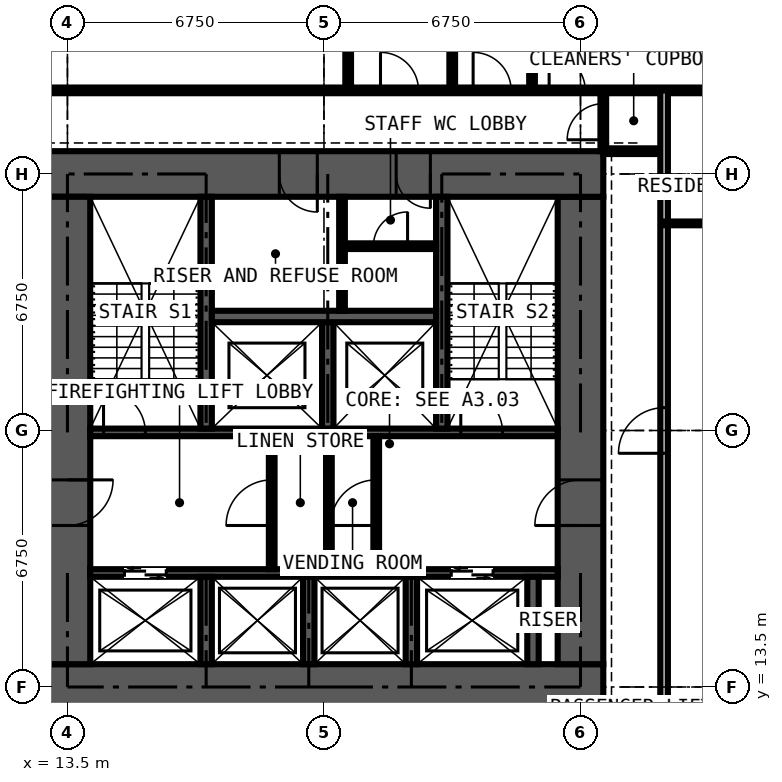
"""IFC4 building model, lengths in metres.
Left out: names, types, materials, properties, quantities, classifications, styles, units other than length and angle.
Written with IfcOpenShell. Run it as: python <this file> out.ifc"""

import sys

from ifc_helpers import new_model, si_unit, direction, frame, frame_2d, origin, place, context, subcontext, project, spatial, rectangle, extrude, element, fill, save


model = new_model("IFC4")
c1 = context("Model", 3, precision=1e-05, world=origin(), true_north=direction((0.0, 1.0)))
c2 = subcontext(c1, "Body", "Model", "MODEL_VIEW")
j1 = project(units=[si_unit("LENGTHUNIT", "METRE"), si_unit("PLANEANGLEUNIT", "RADIAN")], contexts=[c1])
p1 = place(None, origin())
s1 = spatial("IfcSite", under=j1, at=p1, CompositionType="ELEMENT")
p2 = place(p1, origin())
s2 = spatial("IfcBuilding", under=s1, at=p2, CompositionType="ELEMENT")
p3 = place(p2, frame((0.0, 0.0, 43.2)))
s3 = spatial("IfcBuildingStorey", under=s2, at=p3, CompositionType="ELEMENT", Elevation=43.2)
p4 = place(p3, frame((12.9, 13.5, 0.0), z_axis=(0.0, 0.0, 1.0), x_axis=(1.0, 0.0, 0.0)))
e1 = element("IfcWall", 1, at=p4, inside=s3, PredefinedType="SHEAR", context=c2, shape_type="SweptSolid", body=[
    extrude(rectangle(XDim=14.7, YDim=1.2, at=frame_2d((7.35, 0.0))), origin(), (0.0, 0.0, 1.0), 3.6),
])
p5 = place(p3, frame((27.0, 14.1, 0.0), z_axis=(0.0, 0.0, 1.0), x_axis=(0.0, 1.0, 0.0)))
e2 = element("IfcWall", 2, at=p5, inside=s3, PredefinedType="SHEAR", context=c2, shape_type="SweptSolid", body=[
    extrude(rectangle(XDim=12.3, YDim=1.2, at=frame_2d((6.15, 0.0))), origin(), (0.0, 0.0, 1.0), 3.6),
])
p6 = place(p5, frame((3.65, 0.0, 0.0)))
e3 = element("IfcOpeningElement", 3, at=p6, cuts=e2, PredefinedType="OPENING", context=c2, shape_type="SweptSolid", body=[
    extrude(rectangle(XDim=1.2, YDim=2.2, at=frame_2d((0.6, 1.1))), frame((0.0, 0.61, 0.0), z_axis=(0.0, -1.0, 0.0), x_axis=(1.0, 0.0, 0.0)), (0.0, 0.0, 1.0), 1.22),
])
p7 = place(p3, frame((27.6, 27.0, 0.0), z_axis=(0.0, 0.0, 1.0), x_axis=(-1.0, 0.0, 0.0)))
e4 = element("IfcWall", 4, at=p7, inside=s3, PredefinedType="SHEAR", context=c2, shape_type="SweptSolid", body=[
    extrude(rectangle(XDim=14.7, YDim=1.2, at=frame_2d((7.35, 0.0))), origin(), (0.0, 0.0, 1.0), 3.6),
])
p8 = place(p7, frame((4.55, 0.0, 0.0)))
e5 = element("IfcOpeningElement", 5, at=p8, cuts=e4, PredefinedType="OPENING", context=c2, shape_type="SweptSolid", body=[
    extrude(rectangle(XDim=0.9, YDim=2.2, at=frame_2d((0.45, 1.1))), frame((0.0, 0.61, 0.0), z_axis=(0.0, -1.0, 0.0), x_axis=(1.0, 0.0, 0.0)), (0.0, 0.0, 1.0), 1.22),
])
p9 = place(p7, frame((7.525, 0.0, 0.0)))
e6 = element("IfcOpeningElement", 6, at=p9, cuts=e4, PredefinedType="OPENING", context=c2, shape_type="SweptSolid", body=[
    extrude(rectangle(XDim=1.0, YDim=2.2, at=frame_2d((0.5, 1.1))), frame((0.0, 0.61, 0.0), z_axis=(0.0, -1.0, 0.0), x_axis=(1.0, 0.0, 0.0)), (0.0, 0.0, 1.0), 1.22),
])
p10 = place(p3, frame((13.5, 26.4, 0.0), z_axis=(0.0, 0.0, 1.0), x_axis=(0.0, -1.0, 0.0)))
e7 = element("IfcWall", 7, at=p10, inside=s3, PredefinedType="SHEAR", context=c2, shape_type="SweptSolid", body=[
    extrude(rectangle(XDim=12.3, YDim=1.2, at=frame_2d((6.15, 0.0))), origin(), (0.0, 0.0, 1.0), 3.6),
])
p11 = place(p10, frame((7.45, 0.0, 0.0)))
e8 = element("IfcOpeningElement", 8, at=p11, cuts=e7, PredefinedType="OPENING", context=c2, shape_type="SweptSolid", body=[
    extrude(rectangle(XDim=1.2, YDim=2.2, at=frame_2d((0.6, 1.1))), frame((0.0, 0.61, 0.0), z_axis=(0.0, -1.0, 0.0), x_axis=(1.0, 0.0, 0.0)), (0.0, 0.0, 1.0), 1.22),
])
p12 = place(p3, frame((14.1, 16.5, 0.0), z_axis=(0.0, 0.0, 1.0), x_axis=(1.0, 0.0, 0.0)))
e9 = element("IfcWall", 9, at=p12, inside=s3, PredefinedType="SHEAR", context=c2, shape_type="SweptSolid", body=[
    extrude(rectangle(XDim=12.3, YDim=0.2, at=frame_2d((6.15, 0.0))), origin(), (0.0, 0.0, 1.0), 3.6),
])
p13 = place(p12, frame((0.9, 0.0, 0.0)))
e10 = element("IfcOpeningElement", 10, at=p13, cuts=e9, PredefinedType="OPENING", context=c2, shape_type="SweptSolid", body=[
    extrude(rectangle(XDim=1.1, YDim=2.2, at=frame_2d((0.55, 1.1))), frame((0.0, 0.11, 0.0), z_axis=(0.0, -1.0, 0.0), x_axis=(1.0, 0.0, 0.0)), (0.0, 0.0, 1.0), 0.22),
])
p14 = place(p12, frame((9.5, 0.0, 0.0)))
e11 = element("IfcOpeningElement", 11, at=p14, cuts=e9, PredefinedType="OPENING", context=c2, shape_type="SweptSolid", body=[
    extrude(rectangle(XDim=1.1, YDim=2.2, at=frame_2d((0.55, 1.1))), frame((0.0, 0.11, 0.0), z_axis=(0.0, -1.0, 0.0), x_axis=(1.0, 0.0, 0.0)), (0.0, 0.0, 1.0), 0.22),
])
p15 = place(p3, frame((14.1, 20.2, 0.0), z_axis=(0.0, 0.0, 1.0), x_axis=(1.0, 0.0, 0.0)))
e12 = element("IfcWall", 12, at=p15, inside=s3, PredefinedType="SHEAR", context=c2, shape_type="SweptSolid", body=[
    extrude(rectangle(XDim=12.3, YDim=0.2, at=frame_2d((6.15, 0.0))), origin(), (0.0, 0.0, 1.0), 3.6),
])
p16 = place(p15, frame((0.35, 0.0, 0.0)))
e13 = element("IfcOpeningElement", 13, at=p16, cuts=e12, PredefinedType="OPENING", context=c2, shape_type="SweptSolid", body=[
    extrude(rectangle(XDim=1.1, YDim=2.2, at=frame_2d((0.55, 1.1))), frame((0.0, 0.11, 0.0), z_axis=(0.0, -1.0, 0.0), x_axis=(1.0, 0.0, 0.0)), (0.0, 0.0, 1.0), 0.22),
])
p17 = place(p15, frame((9.75, 0.0, 0.0)))
e14 = element("IfcOpeningElement", 14, at=p17, cuts=e12, PredefinedType="OPENING", context=c2, shape_type="SweptSolid", body=[
    extrude(rectangle(XDim=1.1, YDim=2.2, at=frame_2d((0.55, 1.1))), frame((0.0, 0.11, 0.0), z_axis=(0.0, -1.0, 0.0), x_axis=(1.0, 0.0, 0.0)), (0.0, 0.0, 1.0), 0.22),
])
for number, where, z_axis, x_axis in (
    (15, (17.15, 20.3, 0.0), (0.0, 0.0, 1.0), (0.0, 1.0, 0.0)),
    (16, (23.35, 20.3, 0.0), (0.0, 0.0, 1.0), (0.0, 1.0, 0.0)),
):
    element("IfcWall", number, at=place(p3, frame(where, z_axis=z_axis, x_axis=x_axis)), inside=s3, PredefinedType="SHEAR", context=c2, shape_type="SweptSolid", body=[
        extrude(rectangle(XDim=6.1, YDim=0.3, at=frame_2d((3.05, 0.0))), origin(), (0.0, 0.0, 1.0), 3.6),
    ])
p18 = place(p3, frame((20.35, 20.3, 0.0), z_axis=(0.0, 0.0, 1.0), x_axis=(0.0, 1.0, 0.0)))
e17 = element("IfcWall", 17, at=p18, inside=s3, PredefinedType="SHEAR", context=c2, shape_type="SweptSolid", body=[
    extrude(rectangle(XDim=2.8, YDim=0.3, at=frame_2d((1.4, 0.0))), origin(), (0.0, 0.0, 1.0), 3.6),
])
p19 = place(p3, frame((17.3, 23.25, 0.0), z_axis=(0.0, 0.0, 1.0), x_axis=(1.0, 0.0, 0.0)))
e18 = element("IfcWall", 18, at=p19, inside=s3, PredefinedType="SHEAR", context=c2, shape_type="SweptSolid", body=[
    extrude(rectangle(XDim=5.9, YDim=0.3, at=frame_2d((2.95, 0.0))), origin(), (0.0, 0.0, 1.0), 3.6),
])
for number, where, z_axis, x_axis in (
    (19, (17.15, 14.1, 0.0), (0.0, 0.0, 1.0), (0.0, 1.0, 0.0)),
    (20, (19.85, 14.1, 0.0), (0.0, 0.0, 1.0), (0.0, 1.0, 0.0)),
    (21, (22.55, 14.1, 0.0), (0.0, 0.0, 1.0), (0.0, 1.0, 0.0)),
    (22, (25.75, 14.1, 0.0), (0.0, 0.0, 1.0), (0.0, 1.0, 0.0)),
):
    element("IfcWall", number, at=place(p3, frame(where, z_axis=z_axis, x_axis=x_axis)), inside=s3, PredefinedType="SHEAR", context=c2, shape_type="SweptSolid", body=[
        extrude(rectangle(XDim=2.3, YDim=0.3, at=frame_2d((1.15, 0.0))), origin(), (0.0, 0.0, 1.0), 3.6),
    ])
p20 = place(p3, frame((18.875, 16.6, 0.0), z_axis=(0.0, 0.0, 1.0), x_axis=(0.0, 1.0, 0.0)))
e23 = element("IfcWall", 23, at=p20, inside=s3, PredefinedType="PARTITIONING", context=c2, shape_type="SweptSolid", body=[
    extrude(rectangle(XDim=3.5, YDim=0.15, at=frame_2d((1.75, 0.0))), origin(), (0.0, 0.0, 1.0), 3.375),
])
p21 = place(p20, frame((1.15, 0.0, 0.0)))
e24 = element("IfcOpeningElement", 24, at=p21, cuts=e23, PredefinedType="OPENING", context=c2, shape_type="SweptSolid", body=[
    extrude(rectangle(XDim=1.2, YDim=2.2, at=frame_2d((0.6, 1.1))), frame((0.0, 0.085, 0.0), z_axis=(0.0, -1.0, 0.0), x_axis=(1.0, 0.0, 0.0)), (0.0, 0.0, 1.0), 0.17),
])
p22 = place(p3, frame((21.625, 16.6, 0.0), z_axis=(0.0, 0.0, 1.0), x_axis=(0.0, 1.0, 0.0)))
e25 = element("IfcWall", 25, at=p22, inside=s3, PredefinedType="PARTITIONING", context=c2, shape_type="SweptSolid", body=[
    extrude(rectangle(XDim=3.5, YDim=0.15, at=frame_2d((1.75, 0.0))), origin(), (0.0, 0.0, 1.0), 3.375),
])
p23 = place(p22, frame((1.15, 0.0, 0.0)))
e26 = element("IfcOpeningElement", 26, at=p23, cuts=e25, PredefinedType="OPENING", context=c2, shape_type="SweptSolid", body=[
    extrude(rectangle(XDim=1.2, YDim=2.2, at=frame_2d((0.6, 1.1))), frame((0.0, 0.085, 0.0), z_axis=(0.0, -1.0, 0.0), x_axis=(1.0, 0.0, 0.0)), (0.0, 0.0, 1.0), 0.17),
])
p24 = place(p3, frame((20.38, 16.6, 0.0), z_axis=(0.0, 0.0, 1.0), x_axis=(0.0, 1.0, 0.0)))
e27 = element("IfcWall", 27, at=p24, inside=s3, PredefinedType="PARTITIONING", context=c2, shape_type="SweptSolid", body=[
    extrude(rectangle(XDim=3.5, YDim=0.15, at=frame_2d((1.75, 0.0))), origin(), (0.0, 0.0, 1.0), 3.375),
])
p25 = place(p3, frame((20.725, 23.4, 0.0), z_axis=(0.0, 0.0, 1.0), x_axis=(0.0, 1.0, 0.0)))
e28 = element("IfcWall", 28, at=p25, inside=s3, PredefinedType="PARTITIONING", context=c2, shape_type="SweptSolid", body=[
    extrude(rectangle(XDim=3.0, YDim=0.15, at=frame_2d((1.5, 0.0))), origin(), (0.0, 0.0, 1.0), 3.375),
])
p26 = place(p3, frame((20.8, 25.1, 0.0), z_axis=(0.0, 0.0, 1.0), x_axis=(1.0, 0.0, 0.0)))
e29 = element("IfcWall", 29, at=p26, inside=s3, PredefinedType="PARTITIONING", context=c2, shape_type="SweptSolid", body=[
    extrude(rectangle(XDim=2.4, YDim=0.15, at=frame_2d((1.2, 0.0))), origin(), (0.0, 0.0, 1.0), 3.375),
])
p27 = place(p26, frame((0.75, 0.0, 0.0)))
e30 = element("IfcOpeningElement", 30, at=p27, cuts=e29, PredefinedType="OPENING", context=c2, shape_type="SweptSolid", body=[
    extrude(rectangle(XDim=0.9, YDim=2.2, at=frame_2d((0.45, 1.1))), frame((0.0, 0.085, 0.0), z_axis=(0.0, -1.0, 0.0), x_axis=(1.0, 0.0, 0.0)), (0.0, 0.0, 1.0), 0.17),
])
p28 = place(p3, frame((11.3, 29.2, 0.0), z_axis=(0.0, 0.0, 1.0), x_axis=(1.0, 0.0, 0.0)))
e31 = element("IfcWall", 31, at=p28, inside=s3, PredefinedType="PARTITIONING", context=c2, shape_type="SweptSolid", body=[
    extrude(rectangle(XDim=19.075, YDim=0.15, at=frame_2d((9.538, 0.0))), origin(), (0.0, 0.0, 1.0), 3.375),
])
p29 = place(p28, frame((12.875, 0.0, 0.0)))
e32 = element("IfcOpeningElement", 32, at=p29, cuts=e31, PredefinedType="OPENING", context=c2, shape_type="SweptSolid", body=[
    extrude(rectangle(XDim=1.0, YDim=2.2, at=frame_2d((0.5, 1.1))), frame((0.0, 0.085, 0.0), z_axis=(0.0, -1.0, 0.0), x_axis=(1.0, 0.0, 0.0)), (0.0, 0.0, 1.0), 0.17),
])
p30 = place(p28, frame((10.438, 0.0, 0.0)))
e33 = element("IfcOpeningElement", 33, at=p30, cuts=e31, PredefinedType="OPENING", context=c2, shape_type="SweptSolid", body=[
    extrude(rectangle(XDim=1.0, YDim=2.2, at=frame_2d((0.5, 1.1))), frame((0.0, 0.085, 0.0), z_axis=(0.0, -1.0, 0.0), x_axis=(1.0, 0.0, 0.0)), (0.0, 0.0, 1.0), 0.17),
])
p31 = place(p28, frame((14.875, 0.0, 0.0)))
e34 = element("IfcOpeningElement", 34, at=p31, cuts=e31, PredefinedType="OPENING", context=c2, shape_type="SweptSolid", body=[
    extrude(rectangle(XDim=0.95, YDim=2.2, at=frame_2d((0.475, 1.1))), frame((0.0, 0.085, 0.0), z_axis=(0.0, -1.0, 0.0), x_axis=(1.0, 0.0, 0.0)), (0.0, 0.0, 1.0), 0.17),
])
p32 = place(p3, frame((20.887, 29.2, 0.0), z_axis=(0.0, 0.0, 1.0), x_axis=(0.0, 1.0, 0.0)))
e35 = element("IfcWall", 35, at=p32, inside=s3, PredefinedType="PARTITIONING", context=c2, shape_type="SweptSolid", body=[
    extrude(rectangle(XDim=5.65, YDim=0.15, at=frame_2d((2.825, 0.0))), origin(), (0.0, 0.0, 1.0), 3.375),
])
p33 = place(p3, frame((23.625, 29.2, 0.0), z_axis=(0.0, 0.0, 1.0), x_axis=(0.0, 1.0, 0.0)))
e36 = element("IfcWall", 36, at=p33, inside=s3, PredefinedType="PARTITIONING", context=c2, shape_type="SweptSolid", body=[
    extrude(rectangle(XDim=12.034, YDim=0.15, at=frame_2d((6.017, 0.0))), origin(), (0.0, 0.0, 1.0), 3.375),
])
p34 = place(p3, frame((25.725, 29.2, 0.0), z_axis=(0.0, 0.0, 1.0), x_axis=(0.0, 1.0, 0.0)))
e37 = element("IfcWall", 37, at=p34, inside=s3, PredefinedType="PARTITIONING", context=c2, shape_type="SweptSolid", body=[
    extrude(rectangle(XDim=5.65, YDim=0.15, at=frame_2d((2.825, 0.0))), origin(), (0.0, 0.0, 1.0), 3.375),
])
p35 = place(p3, frame((27.6, 27.6, 0.0), z_axis=(0.0, 0.0, 1.0), x_axis=(0.0, 1.0, 0.0)))
e38 = element("IfcWall", 38, at=p35, inside=s3, PredefinedType="PARTITIONING", context=c2, shape_type="SweptSolid", body=[
    extrude(rectangle(XDim=1.6, YDim=0.15, at=frame_2d((0.8, 0.0))), origin(), (0.0, 0.0, 1.0), 3.375),
])
p36 = place(p35, frame((0.3, 0.0, 0.0)))
e39 = element("IfcOpeningElement", 39, at=p36, cuts=e38, PredefinedType="OPENING", context=c2, shape_type="SweptSolid", body=[
    extrude(rectangle(XDim=0.95, YDim=2.2, at=frame_2d((0.475, 1.1))), frame((0.0, 0.085, 0.0), z_axis=(0.0, -1.0, 0.0), x_axis=(1.0, 0.0, 0.0)), (0.0, 0.0, 1.0), 0.17),
])
p37 = place(p3, frame((27.6, 27.6, 0.0), z_axis=(0.0, 0.0, 1.0), x_axis=(1.0, 0.0, 0.0)))
e40 = element("IfcWall", 40, at=p37, inside=s3, PredefinedType="PARTITIONING", context=c2, shape_type="SweptSolid", body=[
    extrude(rectangle(XDim=1.6, YDim=0.15, at=frame_2d((0.8, 0.0))), origin(), (0.0, 0.0, 1.0), 2.877),
])
p38 = place(p3, frame((29.2, 11.3, 0.0), z_axis=(0.0, 0.0, 1.0), x_axis=(0.0, 1.0, 0.0)))
e41 = element("IfcWall", 41, at=p38, inside=s3, PredefinedType="PARTITIONING", context=c2, shape_type="SweptSolid", body=[
    extrude(rectangle(XDim=17.9, YDim=0.2, at=frame_2d((8.95, 0.0))), origin(), (0.0, 0.0, 1.0), 3.375),
])
p39 = place(p38, frame((8.35, 0.0, 0.0)))
e42 = element("IfcOpeningElement", 42, at=p39, cuts=e41, PredefinedType="OPENING", context=c2, shape_type="SweptSolid", body=[
    extrude(rectangle(XDim=1.2, YDim=2.2, at=frame_2d((0.6, 1.1))), frame((0.0, 0.11, 0.0), z_axis=(0.0, -1.0, 0.0), x_axis=(1.0, 0.0, 0.0)), (0.0, 0.0, 1.0), 0.22),
])
p40 = place(p3, frame((29.2, 25.7, 0.0), z_axis=(0.0, 0.0, 1.0), x_axis=(1.0, 0.0, 0.0)))
e43 = element("IfcWall", 43, at=p40, inside=s3, PredefinedType="SHEAR", context=c2, shape_type="SweptSolid", body=[
    extrude(rectangle(XDim=3.45, YDim=0.1, at=frame_2d((1.725, 0.0))), origin(), (0.0, 0.0, 1.0), 3.375),
])
p41 = place(p13, origin())
e44 = element("IfcDoor", 44, at=p41, inside=s3, OperationType="DOUBLE_DOOR_SLIDING", PredefinedType="DOOR", context=c2, shape_type="SweptSolid", body=[
    extrude(rectangle(XDim=1.1, YDim=2.2, at=frame_2d((0.55, 1.1))), frame((0.0, 0.025, 0.0), z_axis=(0.0, -1.0, 0.0), x_axis=(1.0, 0.0, 0.0)), (0.0, 0.0, 1.0), 0.05),
])
fill(e10, e44)
p42 = place(p14, origin())
e45 = element("IfcDoor", 45, at=p42, inside=s3, OperationType="DOUBLE_DOOR_SLIDING", PredefinedType="DOOR", context=c2, shape_type="SweptSolid", body=[
    extrude(rectangle(XDim=1.1, YDim=2.2, at=frame_2d((0.55, 1.1))), frame((0.0, 0.025, 0.0), z_axis=(0.0, -1.0, 0.0), x_axis=(1.0, 0.0, 0.0)), (0.0, 0.0, 1.0), 0.05),
])
fill(e11, e45)
p43 = place(p11, origin())
e46 = element("IfcDoor", 46, at=p43, inside=s3, OperationType="DOUBLE_DOOR_SINGLE_SWING", PredefinedType="DOOR", context=c2, shape_type="SweptSolid", body=[
    extrude(rectangle(XDim=1.2, YDim=2.2, at=frame_2d((0.6, 1.1))), frame((0.0, 0.025, 0.0), z_axis=(0.0, -1.0, 0.0), x_axis=(1.0, 0.0, 0.0)), (0.0, 0.0, 1.0), 0.05),
])
fill(e8, e46)
p44 = place(p6, origin())
e47 = element("IfcDoor", 47, at=p44, inside=s3, OperationType="DOUBLE_DOOR_SINGLE_SWING", PredefinedType="DOOR", context=c2, shape_type="SweptSolid", body=[
    extrude(rectangle(XDim=1.2, YDim=2.2, at=frame_2d((0.6, 1.1))), frame((0.0, 0.025, 0.0), z_axis=(0.0, -1.0, 0.0), x_axis=(1.0, 0.0, 0.0)), (0.0, 0.0, 1.0), 0.05),
])
fill(e3, e47)
p45 = place(p21, origin())
e48 = element("IfcDoor", 48, at=p45, inside=s3, OperationType="DOUBLE_DOOR_SINGLE_SWING", PredefinedType="DOOR", context=c2, shape_type="SweptSolid", body=[
    extrude(rectangle(XDim=1.2, YDim=2.2, at=frame_2d((0.6, 1.1))), frame((0.0, 0.025, 0.0), z_axis=(0.0, -1.0, 0.0), x_axis=(1.0, 0.0, 0.0)), (0.0, 0.0, 1.0), 0.05),
])
fill(e24, e48)
p46 = place(p23, origin())
e49 = element("IfcDoor", 49, at=p46, inside=s3, OperationType="DOUBLE_DOOR_SINGLE_SWING", PredefinedType="DOOR", context=c2, shape_type="SweptSolid", body=[
    extrude(rectangle(XDim=1.2, YDim=2.2, at=frame_2d((0.6, 1.1))), frame((0.0, 0.025, 0.0), z_axis=(0.0, -1.0, 0.0), x_axis=(1.0, 0.0, 0.0)), (0.0, 0.0, 1.0), 0.05),
])
fill(e26, e49)
p47 = place(p27, origin())
e50 = element("IfcDoor", 50, at=p47, inside=s3, OperationType="SINGLE_SWING_RIGHT", PredefinedType="DOOR", context=c2, shape_type="SweptSolid", body=[
    extrude(rectangle(XDim=0.9, YDim=2.2, at=frame_2d((0.45, 1.1))), frame((0.0, 0.025, 0.0), z_axis=(0.0, -1.0, 0.0), x_axis=(1.0, 0.0, 0.0)), (0.0, 0.0, 1.0), 0.05),
])
fill(e30, e50)
p48 = place(p8, origin())
e51 = element("IfcDoor", 51, at=p48, inside=s3, OperationType="SINGLE_SWING_LEFT", PredefinedType="DOOR", context=c2, shape_type="SweptSolid", body=[
    extrude(rectangle(XDim=0.9, YDim=2.2, at=frame_2d((0.45, 1.1))), frame((0.0, 0.4, 0.0), z_axis=(0.0, -1.0, 0.0), x_axis=(1.0, 0.0, 0.0)), (0.0, 0.0, 1.0), 0.8),
])
fill(e5, e51)
p49 = place(p9, origin())
e52 = element("IfcDoor", 52, at=p49, inside=s3, OperationType="SINGLE_SWING_LEFT", PredefinedType="DOOR", context=c2, shape_type="SweptSolid", body=[
    extrude(rectangle(XDim=1.0, YDim=2.2, at=frame_2d((0.5, 1.1))), frame((0.0, 0.025, 0.0), z_axis=(0.0, -1.0, 0.0), x_axis=(1.0, 0.0, 0.0)), (0.0, 0.0, 1.0), 0.05),
])
fill(e6, e52)
p50 = place(p16, origin())
e53 = element("IfcDoor", 53, at=p50, inside=s3, OperationType="SINGLE_SWING_LEFT", PredefinedType="DOOR", context=c2, shape_type="SweptSolid", body=[
    extrude(rectangle(XDim=1.1, YDim=2.2, at=frame_2d((0.55, 1.1))), frame((0.0, 0.025, 0.0), z_axis=(0.0, -1.0, 0.0), x_axis=(1.0, 0.0, 0.0)), (0.0, 0.0, 1.0), 0.05),
])
fill(e13, e53)
p51 = place(p17, origin())
e54 = element("IfcDoor", 54, at=p51, inside=s3, OperationType="SINGLE_SWING_LEFT", PredefinedType="DOOR", context=c2, shape_type="SweptSolid", body=[
    extrude(rectangle(XDim=1.1, YDim=2.2, at=frame_2d((0.55, 1.1))), frame((0.0, 0.025, 0.0), z_axis=(0.0, -1.0, 0.0), x_axis=(1.0, 0.0, 0.0)), (0.0, 0.0, 1.0), 0.05),
])
fill(e14, e54)
p52 = place(p36, origin())
e55 = element("IfcDoor", 55, at=p52, inside=s3, OperationType="SINGLE_SWING_LEFT", PredefinedType="DOOR", context=c2, shape_type="SweptSolid", body=[
    extrude(rectangle(XDim=0.95, YDim=2.2, at=frame_2d((0.475, 1.1))), frame((0.0, 0.025, 0.0), z_axis=(0.0, -1.0, 0.0), x_axis=(1.0, 0.0, 0.0)), (0.0, 0.0, 1.0), 0.05),
])
fill(e39, e55)
p53 = place(p29, origin())
e56 = element("IfcDoor", 56, at=p53, inside=s3, OperationType="SINGLE_SWING_LEFT", PredefinedType="DOOR", context=c2, shape_type="SweptSolid", body=[
    extrude(rectangle(XDim=1.0, YDim=2.2, at=frame_2d((0.5, 1.1))), frame((0.0, 0.025, 0.0), z_axis=(0.0, -1.0, 0.0), x_axis=(1.0, 0.0, 0.0)), (0.0, 0.0, 1.0), 0.05),
])
fill(e32, e56)
p54 = place(p30, origin())
e57 = element("IfcDoor", 57, at=p54, inside=s3, OperationType="SINGLE_SWING_LEFT", PredefinedType="DOOR", context=c2, shape_type="SweptSolid", body=[
    extrude(rectangle(XDim=1.0, YDim=2.2, at=frame_2d((0.5, 1.1))), frame((0.0, 0.025, 0.0), z_axis=(0.0, -1.0, 0.0), x_axis=(1.0, 0.0, 0.0)), (0.0, 0.0, 1.0), 0.05),
])
fill(e33, e57)
p55 = place(p31, origin())
e58 = element("IfcDoor", 58, at=p55, inside=s3, OperationType="SINGLE_SWING_LEFT", PredefinedType="DOOR", context=c2, shape_type="SweptSolid", body=[
    extrude(rectangle(XDim=0.95, YDim=2.2, at=frame_2d((0.475, 1.1))), frame((0.0, 0.025, 0.0), z_axis=(0.0, -1.0, 0.0), x_axis=(1.0, 0.0, 0.0)), (0.0, 0.0, 1.0), 0.05),
])
fill(e34, e58)
p56 = place(p39, origin())
e59 = element("IfcDoor", 59, at=p56, inside=s3, OperationType="DOUBLE_DOOR_SINGLE_SWING", PredefinedType="DOOR", context=c2, shape_type="SweptSolid", body=[
    extrude(rectangle(XDim=1.2, YDim=2.2, at=frame_2d((0.6, 1.1))), frame((0.0, 0.025, 0.0), z_axis=(0.0, -1.0, 0.0), x_axis=(1.0, 0.0, 0.0)), (0.0, 0.0, 1.0), 0.05),
])
fill(e42, e59)
save(model, sys.argv[1])
